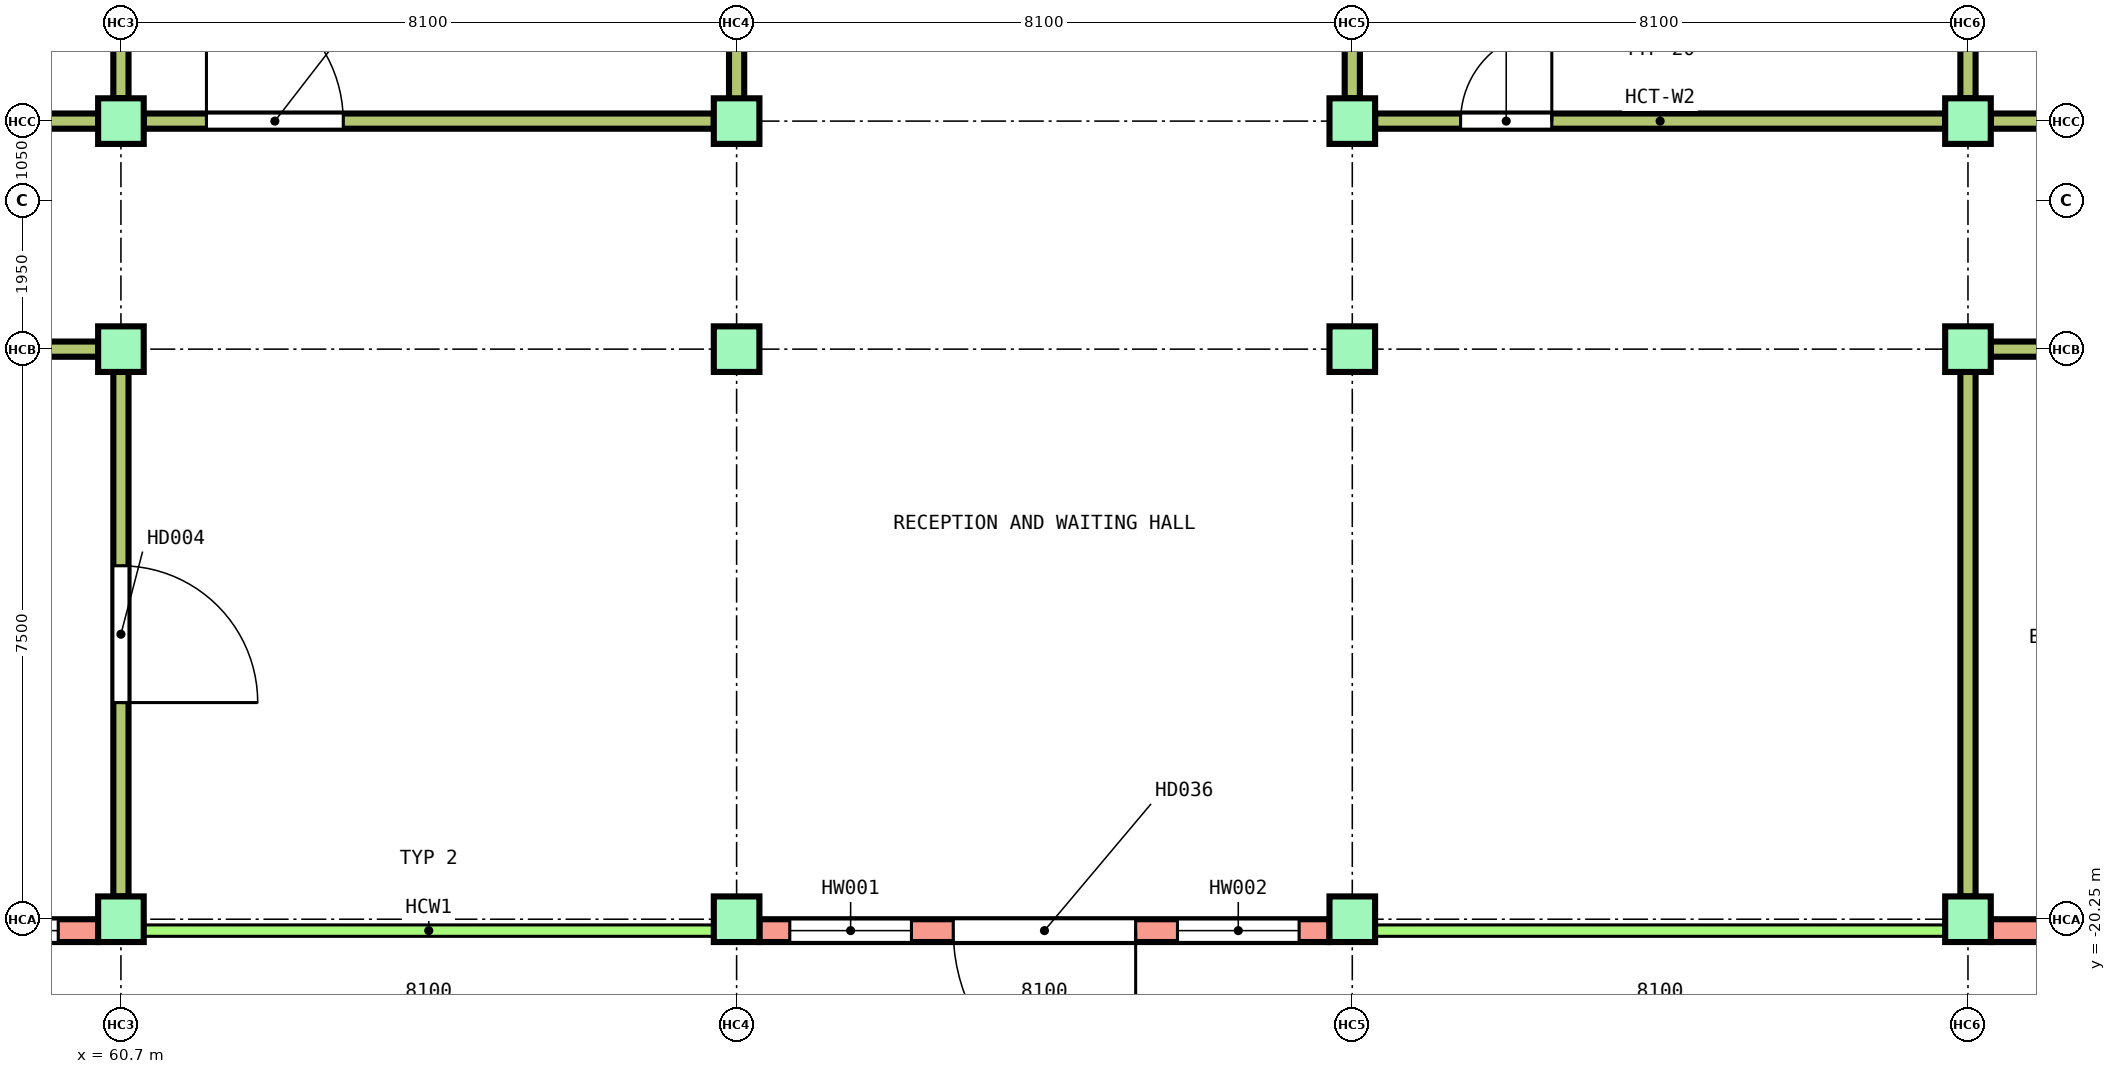
"""IFC4 building model, lengths in metres.
Left out: names, types, materials, properties, quantities, classifications, styles, units other than length and angle.
Written with IfcOpenShell. Run it as: python <this file> out.ifc"""

import sys

from ifc_helpers import new_model, si_unit, direction, frame, frame_2d, origin, origin_2d, place, context, subcontext, project, spatial, rectangle, extrude, element, fill, save


model = new_model("IFC4")
c1 = context("Model", 3, precision=1e-05, world=origin(), true_north=direction((0.0, 1.0)))
c2 = subcontext(c1, "Body", "Model", "MODEL_VIEW")
j1 = project(units=[si_unit("LENGTHUNIT", "METRE"), si_unit("PLANEANGLEUNIT", "RADIAN")], contexts=[c1])
p1 = place(None, origin())
s1 = spatial("IfcSite", under=j1, at=p1, CompositionType="ELEMENT")
p2 = place(p1, origin())
s2 = spatial("IfcBuilding", under=s1, at=p2, CompositionType="ELEMENT")
p3 = place(p2, origin())
s3 = spatial("IfcBuildingStorey", under=s2, at=p3, CompositionType="ELEMENT", Elevation=0.0)
for number, where, z_axis, x_axis in (
    (1, (60.7, -20.25, -0.25), (0.0, 0.0, 1.0), (1.0, 0.0, 0.0)),
    (2, (68.8, -20.25, -0.25), (0.0, 0.0, 1.0), (1.0, 0.0, 0.0)),
    (3, (76.9, -20.25, -0.25), (0.0, 0.0, 1.0), (1.0, 0.0, 0.0)),
    (4, (85.0, -20.25, -0.25), (0.0, 0.0, 1.0), (1.0, 0.0, 0.0)),
    (5, (60.7, -12.75, -0.25), (0.0, 0.0, 1.0), (1.0, 0.0, 0.0)),
    (6, (68.8, -12.75, -0.25), (0.0, 0.0, 1.0), (1.0, 0.0, 0.0)),
    (7, (76.9, -12.75, -0.25), (0.0, 0.0, 1.0), (1.0, 0.0, 0.0)),
    (8, (85.0, -12.75, -0.25), (0.0, 0.0, 1.0), (1.0, 0.0, 0.0)),
    (9, (60.7, -9.75, -0.25), (0.0, 0.0, 1.0), (1.0, 0.0, 0.0)),
    (10, (68.8, -9.75, -0.25), (0.0, 0.0, 1.0), (1.0, 0.0, 0.0)),
    (11, (76.9, -9.75, -0.25), (0.0, 0.0, 1.0), (1.0, 0.0, 0.0)),
    (12, (85.0, -9.75, -0.25), (0.0, 0.0, 1.0), (1.0, 0.0, 0.0)),
):
    element("IfcColumn", number, at=place(p3, frame(where, z_axis=z_axis, x_axis=x_axis)), inside=s3, PredefinedType="COLUMN", context=c2, shape_type="SweptSolid", body=[
        extrude(rectangle(XDim=0.6, YDim=0.6, at=origin_2d()), origin(), (0.0, 0.0, 1.0), 5.85),
    ])
p4 = place(p3, frame((52.9, -20.4, 0.0), z_axis=(0.0, 0.0, 1.0), x_axis=(1.0, 0.0, 0.0)))
e13 = element("IfcWall", 13, at=p4, inside=s3, PredefinedType="SOLIDWALL", context=c2, shape_type="SweptSolid", body=[
    extrude(rectangle(XDim=7.5, YDim=0.3, at=frame_2d((3.75, 0.0))), origin(), (0.0, 0.0, 1.0), 4.8),
])
p5 = place(p4, frame((0.525, 0.0, 0.3)))
e14 = element("IfcOpeningElement", 14, at=p5, cuts=e13, PredefinedType="OPENING", context=c2, shape_type="SweptSolid", body=[
    extrude(rectangle(XDim=2.4, YDim=2.4, at=frame_2d((1.2, 1.2))), frame((0.0, 0.16, 0.0), z_axis=(0.0, -1.0, 0.0), x_axis=(1.0, 0.0, 0.0)), (0.0, 0.0, 1.0), 0.32),
])
p6 = place(p4, frame((4.575, 0.0, 0.3)))
e15 = element("IfcOpeningElement", 15, at=p6, cuts=e13, PredefinedType="OPENING", context=c2, shape_type="SweptSolid", body=[
    extrude(rectangle(XDim=2.4, YDim=2.4, at=frame_2d((1.2, 1.2))), frame((0.0, 0.16, 0.0), z_axis=(0.0, -1.0, 0.0), x_axis=(1.0, 0.0, 0.0)), (0.0, 0.0, 1.0), 0.32),
])
p7 = place(p3, frame((69.1, -20.4, 0.0), z_axis=(0.0, 0.0, 1.0), x_axis=(1.0, 0.0, 0.0)))
e16 = element("IfcWall", 16, at=p7, inside=s3, PredefinedType="SOLIDWALL", context=c2, shape_type="SweptSolid", body=[
    extrude(rectangle(XDim=7.5, YDim=0.3, at=frame_2d((3.75, 0.0))), origin(), (0.0, 0.0, 1.0), 4.8),
])
p8 = place(p7, frame((2.55, 0.0, 0.0)))
e17 = element("IfcOpeningElement", 17, at=p8, cuts=e16, PredefinedType="OPENING", context=c2, shape_type="SweptSolid", body=[
    extrude(rectangle(XDim=2.4, YDim=2.4, at=frame_2d((1.2, 1.2))), frame((0.0, 0.16, 0.0), z_axis=(0.0, -1.0, 0.0), x_axis=(1.0, 0.0, 0.0)), (0.0, 0.0, 1.0), 0.32),
])
p9 = place(p7, frame((0.4, 0.0, 0.0)))
e18 = element("IfcOpeningElement", 18, at=p9, cuts=e16, PredefinedType="OPENING", context=c2, shape_type="SweptSolid", body=[
    extrude(rectangle(XDim=1.6, YDim=2.4, at=frame_2d((0.8, 1.2))), frame((0.0, 0.16, 0.0), z_axis=(0.0, -1.0, 0.0), x_axis=(1.0, 0.0, 0.0)), (0.0, 0.0, 1.0), 0.32),
])
p10 = place(p7, frame((5.5, 0.0, 0.0)))
e19 = element("IfcOpeningElement", 19, at=p10, cuts=e16, PredefinedType="OPENING", context=c2, shape_type="SweptSolid", body=[
    extrude(rectangle(XDim=1.6, YDim=2.4, at=frame_2d((0.8, 1.2))), frame((0.0, 0.16, 0.0), z_axis=(0.0, -1.0, 0.0), x_axis=(1.0, 0.0, 0.0)), (0.0, 0.0, 1.0), 0.32),
])
p11 = place(p3, frame((85.3, -20.4, 0.0), z_axis=(0.0, 0.0, 1.0), x_axis=(1.0, 0.0, 0.0)))
e20 = element("IfcWall", 20, at=p11, inside=s3, PredefinedType="SOLIDWALL", context=c2, shape_type="SweptSolid", body=[
    extrude(rectangle(XDim=7.5, YDim=0.3, at=frame_2d((3.75, 0.0))), origin(), (0.0, 0.0, 1.0), 4.8),
])
p12 = place(p11, frame((0.825, 0.0, 0.9)))
e21 = element("IfcOpeningElement", 21, at=p12, cuts=e20, PredefinedType="OPENING", context=c2, shape_type="SweptSolid", body=[
    extrude(rectangle(XDim=1.8, YDim=1.8, at=frame_2d((0.9, 0.9))), frame((0.0, 0.16, 0.0), z_axis=(0.0, -1.0, 0.0), x_axis=(1.0, 0.0, 0.0)), (0.0, 0.0, 1.0), 0.32),
])
p13 = place(p11, frame((5.175, 0.0, 1.5)))
e22 = element("IfcOpeningElement", 22, at=p13, cuts=e20, PredefinedType="OPENING", context=c2, shape_type="SweptSolid", body=[
    extrude(rectangle(XDim=1.2, YDim=0.9, at=frame_2d((0.6, 0.45))), frame((0.0, 0.16, 0.0), z_axis=(0.0, -1.0, 0.0), x_axis=(1.0, 0.0, 0.0)), (0.0, 0.0, 1.0), 0.32),
])
p14 = place(p3, frame((52.9, -12.75, 0.0), z_axis=(0.0, 0.0, 1.0), x_axis=(1.0, 0.0, 0.0)))
e23 = element("IfcWall", 23, at=p14, inside=s3, PredefinedType="PARTITIONING", context=c2, shape_type="SweptSolid", body=[
    extrude(rectangle(XDim=7.5, YDim=0.2, at=frame_2d((3.75, 0.0))), origin(), (0.0, 0.0, 1.0), 4.8),
])
p15 = place(p3, frame((85.3, -12.75, 0.0), z_axis=(0.0, 0.0, 1.0), x_axis=(1.0, 0.0, 0.0)))
e24 = element("IfcWall", 24, at=p15, inside=s3, PredefinedType="PARTITIONING", context=c2, shape_type="SweptSolid", body=[
    extrude(rectangle(XDim=7.5, YDim=0.2, at=frame_2d((3.75, 0.0))), origin(), (0.0, 0.0, 1.0), 4.8),
])
p16 = place(p15, frame((1.125, 0.0, 0.0)))
e25 = element("IfcOpeningElement", 25, at=p16, cuts=e24, PredefinedType="OPENING", context=c2, shape_type="SweptSolid", body=[
    extrude(rectangle(XDim=1.2, YDim=2.1, at=frame_2d((0.6, 1.05))), frame((0.0, 0.11, 0.0), z_axis=(0.0, -1.0, 0.0), x_axis=(1.0, 0.0, 0.0)), (0.0, 0.0, 1.0), 0.22),
])
p17 = place(p15, frame((5.275, 0.0, 0.0)))
e26 = element("IfcOpeningElement", 26, at=p17, cuts=e24, PredefinedType="OPENING", context=c2, shape_type="SweptSolid", body=[
    extrude(rectangle(XDim=1.0, YDim=2.1, at=frame_2d((0.5, 1.05))), frame((0.0, 0.11, 0.0), z_axis=(0.0, -1.0, 0.0), x_axis=(1.0, 0.0, 0.0)), (0.0, 0.0, 1.0), 0.22),
])
p18 = place(p3, frame((60.7, -19.95, 0.0), z_axis=(0.0, 0.0, 1.0), x_axis=(0.0, 1.0, 0.0)))
e27 = element("IfcWall", 27, at=p18, inside=s3, PredefinedType="PARTITIONING", context=c2, shape_type="SweptSolid", body=[
    extrude(rectangle(XDim=6.9, YDim=0.2, at=frame_2d((3.45, 0.0))), origin(), (0.0, 0.0, 1.0), 4.8),
])
p19 = place(p18, frame((2.55, 0.0, 0.0)))
e28 = element("IfcOpeningElement", 28, at=p19, cuts=e27, PredefinedType="OPENING", context=c2, shape_type="SweptSolid", body=[
    extrude(rectangle(XDim=1.8, YDim=2.1, at=frame_2d((0.9, 1.05))), frame((0.0, 0.11, 0.0), z_axis=(0.0, -1.0, 0.0), x_axis=(1.0, 0.0, 0.0)), (0.0, 0.0, 1.0), 0.22),
])
p20 = place(p3, frame((60.7, -9.45, 0.0), z_axis=(0.0, 0.0, 1.0), x_axis=(0.0, 1.0, 0.0)))
e29 = element("IfcWall", 29, at=p20, inside=s3, PredefinedType="PARTITIONING", context=c2, shape_type="SweptSolid", body=[
    extrude(rectangle(XDim=9.15, YDim=0.2, at=frame_2d((4.575, 0.0))), origin(), (0.0, 0.0, 1.0), 4.8),
])
p21 = place(p3, frame((52.9, -9.75, 0.0), z_axis=(0.0, 0.0, 1.0), x_axis=(1.0, 0.0, 0.0)))
e30 = element("IfcWall", 30, at=p21, inside=s3, PredefinedType="PARTITIONING", context=c2, shape_type="SweptSolid", body=[
    extrude(rectangle(XDim=7.5, YDim=0.2, at=frame_2d((3.75, 0.0))), origin(), (0.0, 0.0, 1.0), 4.8),
])
p22 = place(p21, frame((1.125, 0.0, 0.0)))
e31 = element("IfcOpeningElement", 31, at=p22, cuts=e30, PredefinedType="OPENING", context=c2, shape_type="SweptSolid", body=[
    extrude(rectangle(XDim=1.2, YDim=2.1, at=frame_2d((0.6, 1.05))), frame((0.0, 0.11, 0.0), z_axis=(0.0, -1.0, 0.0), x_axis=(1.0, 0.0, 0.0)), (0.0, 0.0, 1.0), 0.22),
])
p23 = place(p3, frame((61.0, -9.75, 0.0), z_axis=(0.0, 0.0, 1.0), x_axis=(1.0, 0.0, 0.0)))
e32 = element("IfcWall", 32, at=p23, inside=s3, PredefinedType="PARTITIONING", context=c2, shape_type="SweptSolid", body=[
    extrude(rectangle(XDim=7.5, YDim=0.2, at=frame_2d((3.75, 0.0))), origin(), (0.0, 0.0, 1.0), 4.8),
])
p24 = place(p23, frame((0.825, 0.0, 0.0)))
e33 = element("IfcOpeningElement", 33, at=p24, cuts=e32, PredefinedType="OPENING", context=c2, shape_type="SweptSolid", body=[
    extrude(rectangle(XDim=1.8, YDim=2.1, at=frame_2d((0.9, 1.05))), frame((0.0, 0.11, 0.0), z_axis=(0.0, -1.0, 0.0), x_axis=(1.0, 0.0, 0.0)), (0.0, 0.0, 1.0), 0.22),
])
p25 = place(p3, frame((77.2, -9.75, 0.0), z_axis=(0.0, 0.0, 1.0), x_axis=(1.0, 0.0, 0.0)))
e34 = element("IfcWall", 34, at=p25, inside=s3, PredefinedType="PARTITIONING", context=c2, shape_type="SweptSolid", body=[
    extrude(rectangle(XDim=7.5, YDim=0.2, at=frame_2d((3.75, 0.0))), origin(), (0.0, 0.0, 1.0), 4.8),
])
p26 = place(p25, frame((1.125, 0.0, 0.0)))
e35 = element("IfcOpeningElement", 35, at=p26, cuts=e34, PredefinedType="OPENING", context=c2, shape_type="SweptSolid", body=[
    extrude(rectangle(XDim=1.2, YDim=2.1, at=frame_2d((0.6, 1.05))), frame((0.0, 0.11, 0.0), z_axis=(0.0, -1.0, 0.0), x_axis=(1.0, 0.0, 0.0)), (0.0, 0.0, 1.0), 0.22),
])
p27 = place(p3, frame((85.3, -9.75, 0.0), z_axis=(0.0, 0.0, 1.0), x_axis=(1.0, 0.0, 0.0)))
e36 = element("IfcWall", 36, at=p27, inside=s3, PredefinedType="PARTITIONING", context=c2, shape_type="SweptSolid", body=[
    extrude(rectangle(XDim=7.5, YDim=0.2, at=frame_2d((3.75, 0.0))), origin(), (0.0, 0.0, 1.0), 4.8),
])
p28 = place(p27, frame((1.225, 0.0, 0.0)))
e37 = element("IfcOpeningElement", 37, at=p28, cuts=e36, PredefinedType="OPENING", context=c2, shape_type="SweptSolid", body=[
    extrude(rectangle(XDim=1.0, YDim=2.1, at=frame_2d((0.5, 1.05))), frame((0.0, 0.11, 0.0), z_axis=(0.0, -1.0, 0.0), x_axis=(1.0, 0.0, 0.0)), (0.0, 0.0, 1.0), 0.22),
])
p29 = place(p27, frame((5.275, 0.0, 0.0)))
e38 = element("IfcOpeningElement", 38, at=p29, cuts=e36, PredefinedType="OPENING", context=c2, shape_type="SweptSolid", body=[
    extrude(rectangle(XDim=1.0, YDim=2.1, at=frame_2d((0.5, 1.05))), frame((0.0, 0.11, 0.0), z_axis=(0.0, -1.0, 0.0), x_axis=(1.0, 0.0, 0.0)), (0.0, 0.0, 1.0), 0.22),
])
p30 = place(p3, frame((85.0, -19.95, 0.0), z_axis=(0.0, 0.0, 1.0), x_axis=(0.0, 1.0, 0.0)))
e39 = element("IfcWall", 39, at=p30, inside=s3, PredefinedType="PARTITIONING", context=c2, shape_type="SweptSolid", body=[
    extrude(rectangle(XDim=6.9, YDim=0.2, at=frame_2d((3.45, 0.0))), origin(), (0.0, 0.0, 1.0), 4.8),
])
p31 = place(p3, frame((85.0, -9.45, 0.0), z_axis=(0.0, 0.0, 1.0), x_axis=(0.0, 1.0, 0.0)))
e40 = element("IfcWall", 40, at=p31, inside=s3, PredefinedType="PARTITIONING", context=c2, shape_type="SweptSolid", body=[
    extrude(rectangle(XDim=9.15, YDim=0.2, at=frame_2d((4.575, 0.0))), origin(), (0.0, 0.0, 1.0), 4.8),
])
p32 = place(p3, frame((68.8, -9.75, 0.0), z_axis=(0.0, 0.0, 1.0), x_axis=(0.0, 1.0, 0.0)))
e41 = element("IfcWall", 41, at=p32, inside=s3, PredefinedType="PARTITIONING", context=c2, shape_type="SweptSolid", body=[
    extrude(rectangle(XDim=19.5, YDim=0.2, at=frame_2d((9.75, 0.0))), origin(), (0.0, 0.0, 1.0), 4.8),
])
p33 = place(p3, frame((76.9, -9.45, 0.0), z_axis=(0.0, 0.0, 1.0), x_axis=(0.0, 1.0, 0.0)))
e42 = element("IfcWall", 42, at=p33, inside=s3, PredefinedType="PARTITIONING", context=c2, shape_type="SweptSolid", body=[
    extrude(rectangle(XDim=9.15, YDim=0.2, at=frame_2d((4.575, 0.0))), origin(), (0.0, 0.0, 1.0), 4.8),
])
p34 = place(p19, origin())
e43 = element("IfcDoor", 43, at=p34, inside=s3, OperationType="DOUBLE_DOOR_SINGLE_SWING", PredefinedType="DOOR", context=c2, shape_type="SweptSolid", body=[
    extrude(rectangle(XDim=1.8, YDim=2.1, at=frame_2d((0.9, 1.05))), frame((0.0, 0.025, 0.0), z_axis=(0.0, -1.0, 0.0), x_axis=(1.0, 0.0, 0.0)), (0.0, 0.0, 1.0), 0.05),
])
fill(e28, e43)
p35 = place(p24, origin())
e44 = element("IfcDoor", 44, at=p35, inside=s3, OperationType="DOUBLE_DOOR_SINGLE_SWING", PredefinedType="DOOR", context=c2, shape_type="SweptSolid", body=[
    extrude(rectangle(XDim=1.8, YDim=2.1, at=frame_2d((0.9, 1.05))), frame((0.0, 0.025, 0.0), z_axis=(0.0, -1.0, 0.0), x_axis=(1.0, 0.0, 0.0)), (0.0, 0.0, 1.0), 0.05),
])
fill(e33, e44)
p36 = place(p26, origin())
e45 = element("IfcDoor", 45, at=p36, inside=s3, OperationType="SINGLE_SWING_LEFT", PredefinedType="DOOR", context=c2, shape_type="SweptSolid", body=[
    extrude(rectangle(XDim=1.2, YDim=2.1, at=frame_2d((0.6, 1.05))), frame((0.0, 0.025, 0.0), z_axis=(0.0, -1.0, 0.0), x_axis=(1.0, 0.0, 0.0)), (0.0, 0.0, 1.0), 0.05),
])
fill(e35, e45)
p37 = place(p8, origin())
e46 = element("IfcDoor", 46, at=p37, inside=s3, OperationType="DOUBLE_DOOR_SINGLE_SWING", PredefinedType="DOOR", context=c2, shape_type="SweptSolid", body=[
    extrude(rectangle(XDim=2.4, YDim=2.4, at=frame_2d((1.2, 1.2))), frame((0.0, 0.025, 0.0), z_axis=(0.0, -1.0, 0.0), x_axis=(1.0, 0.0, 0.0)), (0.0, 0.0, 1.0), 0.05),
])
fill(e17, e46)
p38 = place(p9, origin())
e47 = element("IfcWindow", 47, at=p38, inside=s3, PartitioningType="SINGLE_PANEL", PredefinedType="WINDOW", context=c2, shape_type="SweptSolid", body=[
    extrude(rectangle(XDim=1.6, YDim=2.4, at=frame_2d((0.8, 1.2))), frame((0.0, 0.03, 0.0), z_axis=(0.0, -1.0, 0.0), x_axis=(1.0, 0.0, 0.0)), (0.0, 0.0, 1.0), 0.06),
])
fill(e18, e47)
p39 = place(p10, origin())
e48 = element("IfcWindow", 48, at=p39, inside=s3, PartitioningType="SINGLE_PANEL", PredefinedType="WINDOW", context=c2, shape_type="SweptSolid", body=[
    extrude(rectangle(XDim=1.6, YDim=2.4, at=frame_2d((0.8, 1.2))), frame((0.0, 0.03, 0.0), z_axis=(0.0, -1.0, 0.0), x_axis=(1.0, 0.0, 0.0)), (0.0, 0.0, 1.0), 0.06),
])
fill(e19, e48)
p40 = place(p6, origin())
e49 = element("IfcWindow", 49, at=p40, inside=s3, PartitioningType="DOUBLE_PANEL_VERTICAL", PredefinedType="WINDOW", context=c2, shape_type="SweptSolid", body=[
    extrude(rectangle(XDim=2.4, YDim=2.4, at=frame_2d((1.2, 1.2))), frame((0.0, 0.03, 0.0), z_axis=(0.0, -1.0, 0.0), x_axis=(1.0, 0.0, 0.0)), (0.0, 0.0, 1.0), 0.06),
])
fill(e15, e49)
save(model, sys.argv[1])
